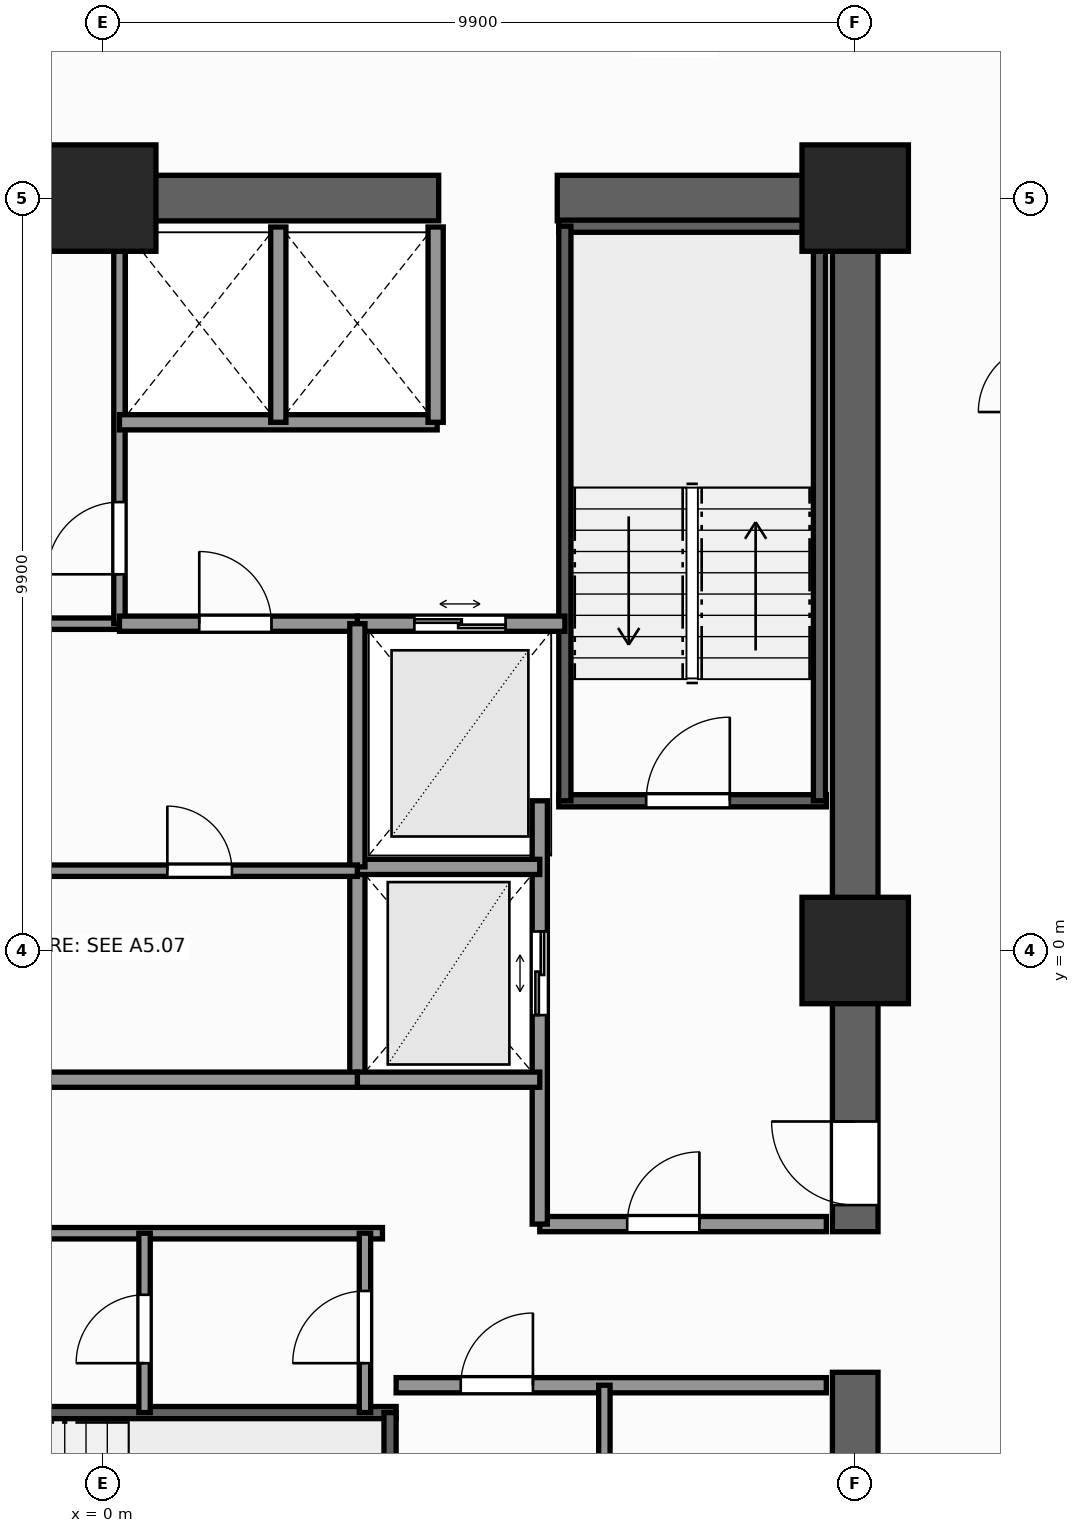
"""IFC4 building model, lengths in metres.
Left out: names, types, materials, properties, quantities, classifications, styles, units other than length and angle.
Written with IfcOpenShell. Run it as: python <this file> out.ifc"""

import sys

from ifc_helpers import new_model, si_unit, direction, frame, frame_2d, origin, origin_2d, place, context, subcontext, project, spatial, rectangle, extrude, element, fill, save


model = new_model("IFC4")
c1 = context("Model", 3, precision=1e-05, world=origin(), true_north=direction((0.0, 1.0)))
c2 = subcontext(c1, "Body", "Model", "MODEL_VIEW")
j1 = project(units=[si_unit("LENGTHUNIT", "METRE"), si_unit("PLANEANGLEUNIT", "RADIAN")], contexts=[c1])
p1 = place(None, origin())
s1 = spatial("IfcSite", under=j1, at=p1, CompositionType="ELEMENT")
p2 = place(p1, origin())
s2 = spatial("IfcBuilding", under=s1, at=p2, CompositionType="ELEMENT")
p3 = place(p2, frame((0.0, 0.0, 92.0)))
s3 = spatial("IfcBuildingStorey", under=s2, at=p3, CompositionType="ELEMENT", Elevation=92.0)
p4 = place(p3, frame((-10.2, 9.9, 0.0), z_axis=(0.0, 0.0, 1.0), x_axis=(1.0, 0.0, 0.0)))
e1 = element("IfcWall", 1, at=p4, inside=s3, PredefinedType="SHEAR", context=c2, shape_type="SweptSolid", body=[
    extrude(rectangle(XDim=14.62, YDim=0.6, at=frame_2d((7.31, 0.0))), origin(), (0.0, 0.0, 1.0), 3.3),
])
p5 = place(p3, frame((5.98, 9.9, 0.0), z_axis=(0.0, 0.0, 1.0), x_axis=(1.0, 0.0, 0.0)))
e2 = element("IfcWall", 2, at=p5, inside=s3, PredefinedType="SHEAR", context=c2, shape_type="SweptSolid", body=[
    extrude(rectangle(XDim=4.22, YDim=0.6, at=frame_2d((2.11, 0.0))), origin(), (0.0, 0.0, 1.0), 3.3),
])
p6 = place(p3, frame((9.9, -9.6, 0.0), z_axis=(0.0, 0.0, 1.0), x_axis=(0.0, 1.0, 0.0)))
e3 = element("IfcWall", 3, at=p6, inside=s3, PredefinedType="SHEAR", context=c2, shape_type="SweptSolid", body=[
    extrude(rectangle(XDim=4.05, YDim=0.6, at=frame_2d((2.025, 0.0))), origin(), (0.0, 0.0, 1.0), 3.3),
])
p7 = place(p3, frame((9.9, -3.7, 0.0), z_axis=(0.0, 0.0, 1.0), x_axis=(0.0, 1.0, 0.0)))
e4 = element("IfcWall", 4, at=p7, inside=s3, PredefinedType="SHEAR", context=c2, shape_type="SweptSolid", body=[
    extrude(rectangle(XDim=13.3, YDim=0.6, at=frame_2d((6.65, 0.0))), origin(), (0.0, 0.0, 1.0), 3.3),
])
p8 = place(p7, frame((0.35, 0.0, 0.0)))
e5 = element("IfcOpeningElement", 5, at=p8, cuts=e4, PredefinedType="OPENING", context=c2, shape_type="SweptSolid", body=[
    extrude(rectangle(XDim=1.1, YDim=2.2, at=frame_2d((0.55, 1.1))), frame((0.0, 0.31, 0.0), z_axis=(0.0, -1.0, 0.0), x_axis=(1.0, 0.0, 0.0)), (0.0, 0.0, 1.0), 0.62),
])
for number, where, z_axis, x_axis in (
    (6, (9.9, 9.9, 0.0), (0.0, 0.0, 1.0), (1.0, 0.0, 0.0)),
    (7, (9.9, 0.0, 0.0), (0.0, 0.0, 1.0), (1.0, 0.0, 0.0)),
    (8, (0.0, 9.9, 0.0), (0.0, 0.0, 1.0), (1.0, 0.0, 0.0)),
):
    element("IfcColumn", number, at=place(p3, frame(where, z_axis=z_axis, x_axis=x_axis)), inside=s3, PredefinedType="COLUMN", context=c2, shape_type="SweptSolid", body=[
        extrude(rectangle(XDim=1.4, YDim=1.4, at=origin_2d()), origin(), (0.0, 0.0, 1.0), 3.3),
    ])
p9 = place(p3, frame((6.0, 1.97, 0.0), z_axis=(0.0, 0.0, 1.0), x_axis=(1.0, 0.0, 0.0)))
e9 = element("IfcWall", 9, at=p9, inside=s3, PredefinedType="SHEAR", context=c2, shape_type="SweptSolid", body=[
    extrude(rectangle(XDim=3.52, YDim=0.16, at=frame_2d((1.76, 0.0))), origin(), (0.0, 0.0, 1.0), 3.3),
])
p10 = place(p9, frame((1.15, 0.0, 0.0)))
e10 = element("IfcOpeningElement", 10, at=p10, cuts=e9, PredefinedType="OPENING", context=c2, shape_type="SweptSolid", body=[
    extrude(rectangle(XDim=1.1, YDim=2.2, at=frame_2d((0.55, 1.1))), frame((0.0, 0.09, 0.0), z_axis=(0.0, -1.0, 0.0), x_axis=(1.0, 0.0, 0.0)), (0.0, 0.0, 1.0), 0.18),
])
p11 = place(p3, frame((6.0, 9.53, 0.0), z_axis=(0.0, 0.0, 1.0), x_axis=(1.0, 0.0, 0.0)))
e11 = element("IfcWall", 11, at=p11, inside=s3, PredefinedType="SHEAR", context=c2, shape_type="SweptSolid", body=[
    extrude(rectangle(XDim=3.52, YDim=0.16, at=frame_2d((1.76, 0.0))), origin(), (0.0, 0.0, 1.0), 3.3),
])
for number, where, z_axis, x_axis in (
    (12, (6.08, 1.97, 0.0), (0.0, 0.0, 1.0), (0.0, 1.0, 0.0)),
    (13, (9.43, 1.97, 0.0), (0.0, 0.0, 1.0), (0.0, 1.0, 0.0)),
):
    element("IfcWall", number, at=place(p3, frame(where, z_axis=z_axis, x_axis=x_axis)), inside=s3, PredefinedType="SHEAR", context=c2, shape_type="SweptSolid", body=[
        extrude(rectangle(XDim=7.56, YDim=0.16, at=frame_2d((3.78, 0.0))), origin(), (0.0, 0.0, 1.0), 3.3),
    ])
p12 = place(p3, frame((-3.86, -6.08, 0.0), z_axis=(0.0, 0.0, 1.0), x_axis=(1.0, 0.0, 0.0)))
e14 = element("IfcWall", 14, at=p12, inside=s3, PredefinedType="SHEAR", context=c2, shape_type="SweptSolid", body=[
    extrude(rectangle(XDim=7.72, YDim=0.16, at=frame_2d((3.86, 0.0))), origin(), (0.0, 0.0, 1.0), 3.3),
])
p13 = place(p3, frame((3.78, -9.43, 0.0), z_axis=(0.0, 0.0, 1.0), x_axis=(0.0, 1.0, 0.0)))
e15 = element("IfcWall", 15, at=p13, inside=s3, PredefinedType="SHEAR", context=c2, shape_type="SweptSolid", body=[
    extrude(rectangle(XDim=3.35, YDim=0.16, at=frame_2d((1.675, 0.0))), origin(), (0.0, 0.0, 1.0), 3.3),
])
p14 = place(p3, frame((5.75, -3.6, 0.0), z_axis=(0.0, 0.0, 1.0), x_axis=(1.0, 0.0, 0.0)))
e16 = element("IfcWall", 16, at=p14, inside=s3, PredefinedType="SOLIDWALL", context=c2, shape_type="SweptSolid", body=[
    extrude(rectangle(XDim=3.77, YDim=0.2, at=frame_2d((1.885, 0.0))), origin(), (0.0, 0.0, 1.0), 3.08),
])
p15 = place(p14, frame((1.15, 0.0, 0.0)))
e17 = element("IfcOpeningElement", 17, at=p15, cuts=e16, PredefinedType="OPENING", context=c2, shape_type="SweptSolid", body=[
    extrude(rectangle(XDim=0.95, YDim=2.06, at=frame_2d((0.475, 1.03))), frame((0.0, 0.11, 0.0), z_axis=(0.0, -1.0, 0.0), x_axis=(1.0, 0.0, 0.0)), (0.0, 0.0, 1.0), 0.22),
])
p16 = place(p3, frame((5.75, -3.6, 0.0), z_axis=(0.0, 0.0, 1.0), x_axis=(0.0, 1.0, 0.0)))
e18 = element("IfcWall", 18, at=p16, inside=s3, PredefinedType="SOLIDWALL", context=c2, shape_type="SweptSolid", body=[
    extrude(rectangle(XDim=5.57, YDim=0.2, at=frame_2d((2.785, 0.0))), origin(), (0.0, 0.0, 1.0), 3.08),
])
p17 = place(p16, frame((2.75, 0.0, 0.0)))
e19 = element("IfcOpeningElement", 19, at=p17, cuts=e18, PredefinedType="OPENING", context=c2, shape_type="SweptSolid", body=[
    extrude(rectangle(XDim=1.1, YDim=2.2, at=frame_2d((0.55, 1.1))), frame((0.0, 0.11, 0.0), z_axis=(0.0, -1.0, 0.0), x_axis=(1.0, 0.0, 0.0)), (0.0, 0.0, 1.0), 0.22),
])
p18 = place(p3, frame((3.35, -1.7, 0.0), z_axis=(0.0, 0.0, 1.0), x_axis=(0.0, 1.0, 0.0)))
e20 = element("IfcWall", 20, at=p18, inside=s3, PredefinedType="SOLIDWALL", context=c2, shape_type="SweptSolid", body=[
    extrude(rectangle(XDim=2.8, YDim=0.2, at=frame_2d((1.4, 0.0))), origin(), (0.0, 0.0, 1.0), 3.08),
])
for number, where, z_axis, x_axis in (
    (21, (3.35, -1.7, 0.0), (0.0, 0.0, 1.0), (1.0, 0.0, 0.0)),
    (22, (3.35, 1.1, 0.0), (0.0, 0.0, 1.0), (1.0, 0.0, 0.0)),
):
    element("IfcWall", number, at=place(p3, frame(where, z_axis=z_axis, x_axis=x_axis)), inside=s3, PredefinedType="SOLIDWALL", context=c2, shape_type="SweptSolid", body=[
        extrude(rectangle(XDim=2.4, YDim=0.2, at=frame_2d((1.2, 0.0))), origin(), (0.0, 0.0, 1.0), 3.08),
    ])
p19 = place(p3, frame((3.35, 4.3, 0.0), z_axis=(0.0, 0.0, 1.0), x_axis=(1.0, 0.0, 0.0)))
e23 = element("IfcWall", 23, at=p19, inside=s3, PredefinedType="SOLIDWALL", context=c2, shape_type="SweptSolid", body=[
    extrude(rectangle(XDim=2.73, YDim=0.2, at=frame_2d((1.365, 0.0))), origin(), (0.0, 0.0, 1.0), 3.08),
])
p20 = place(p19, frame((0.75, 0.0, 0.0)))
e24 = element("IfcOpeningElement", 24, at=p20, cuts=e23, PredefinedType="OPENING", context=c2, shape_type="SweptSolid", body=[
    extrude(rectangle(XDim=1.2, YDim=2.25, at=frame_2d((0.6, 1.125))), frame((0.0, 0.11, 0.0), z_axis=(0.0, -1.0, 0.0), x_axis=(1.0, 0.0, 0.0)), (0.0, 0.0, 1.0), 0.22),
])
p21 = place(p3, frame((-6.08, 4.3, 0.0), z_axis=(0.0, 0.0, 1.0), x_axis=(1.0, 0.0, 0.0)))
e25 = element("IfcWall", 25, at=p21, inside=s3, PredefinedType="PARTITIONING", context=c2, shape_type="SweptSolid", body=[
    extrude(rectangle(XDim=6.3, YDim=0.15, at=frame_2d((3.15, 0.0))), origin(), (0.0, 0.0, 1.0), 3.08),
])
p22 = place(p21, frame((1.05, 0.0, 0.0)))
e26 = element("IfcOpeningElement", 26, at=p22, cuts=e25, PredefinedType="OPENING", context=c2, shape_type="SweptSolid", body=[
    extrude(rectangle(XDim=0.85, YDim=2.03, at=frame_2d((0.425, 1.015))), frame((0.0, 0.085, 0.0), z_axis=(0.0, -1.0, 0.0), x_axis=(1.0, 0.0, 0.0)), (0.0, 0.0, 1.0), 0.17),
])
p23 = place(p3, frame((0.22, 4.3, 0.0), z_axis=(0.0, 0.0, 1.0), x_axis=(0.0, 1.0, 0.0)))
e27 = element("IfcWall", 27, at=p23, inside=s3, PredefinedType="PARTITIONING", context=c2, shape_type="SweptSolid", body=[
    extrude(rectangle(XDim=5.22, YDim=0.15, at=frame_2d((2.61, 0.0))), origin(), (0.0, 0.0, 1.0), 3.08),
])
p24 = place(p23, frame((0.65, 0.0, 0.0)))
e28 = element("IfcOpeningElement", 28, at=p24, cuts=e27, PredefinedType="OPENING", context=c2, shape_type="SweptSolid", body=[
    extrude(rectangle(XDim=0.95, YDim=2.06, at=frame_2d((0.475, 1.03))), frame((0.0, 0.085, 0.0), z_axis=(0.0, -1.0, 0.0), x_axis=(1.0, 0.0, 0.0)), (0.0, 0.0, 1.0), 0.17),
])
p25 = place(p3, frame((0.22, 6.95, 0.0), z_axis=(0.0, 0.0, 1.0), x_axis=(1.0, 0.0, 0.0)))
e29 = element("IfcWall", 29, at=p25, inside=s3, PredefinedType="SOLIDWALL", context=c2, shape_type="SweptSolid", body=[
    extrude(rectangle(XDim=4.18, YDim=0.2, at=frame_2d((2.09, 0.0))), origin(), (0.0, 0.0, 1.0), 3.08),
])
for number, where, z_axis, x_axis in (
    (30, (4.38, 6.95, 0.0), (0.0, 0.0, 1.0), (0.0, 1.0, 0.0)),
    (31, (2.31, 6.95, 0.0), (0.0, 0.0, 1.0), (0.0, 1.0, 0.0)),
):
    element("IfcWall", number, at=place(p3, frame(where, z_axis=z_axis, x_axis=x_axis)), inside=s3, PredefinedType="SOLIDWALL", context=c2, shape_type="SweptSolid", body=[
        extrude(rectangle(XDim=2.57, YDim=0.2, at=frame_2d((1.285, 0.0))), origin(), (0.0, 0.0, 1.0), 3.08),
    ])
p26 = place(p3, frame((3.86, -5.72, 0.0), z_axis=(0.0, 0.0, 1.0), x_axis=(1.0, 0.0, 0.0)))
e32 = element("IfcWall", 32, at=p26, inside=s3, PredefinedType="SOLIDWALL", context=c2, shape_type="SweptSolid", body=[
    extrude(rectangle(XDim=5.66, YDim=0.2, at=frame_2d((2.83, 0.0))), origin(), (0.0, 0.0, 1.0), 3.08),
])
p27 = place(p26, frame((0.85, 0.0, 0.0)))
e33 = element("IfcOpeningElement", 33, at=p27, cuts=e32, PredefinedType="OPENING", context=c2, shape_type="SweptSolid", body=[
    extrude(rectangle(XDim=0.95, YDim=2.06, at=frame_2d((0.475, 1.03))), frame((0.0, 0.11, 0.0), z_axis=(0.0, -1.0, 0.0), x_axis=(1.0, 0.0, 0.0)), (0.0, 0.0, 1.0), 0.22),
])
p28 = place(p3, frame((6.6, -9.52, 0.0), z_axis=(0.0, 0.0, 1.0), x_axis=(0.0, 1.0, 0.0)))
e34 = element("IfcWall", 34, at=p28, inside=s3, PredefinedType="PARTITIONING", context=c2, shape_type="SweptSolid", body=[
    extrude(rectangle(XDim=3.8, YDim=0.15, at=frame_2d((1.9, 0.0))), origin(), (0.0, 0.0, 1.0), 3.08),
])
p29 = place(p28, frame((0.9, 0.0, 0.0)))
e35 = element("IfcOpeningElement", 35, at=p29, cuts=e34, PredefinedType="OPENING", context=c2, shape_type="SweptSolid", body=[
    extrude(rectangle(XDim=0.85, YDim=2.03, at=frame_2d((0.425, 1.015))), frame((0.0, 0.085, 0.0), z_axis=(0.0, -1.0, 0.0), x_axis=(1.0, 0.0, 0.0)), (0.0, 0.0, 1.0), 0.17),
])
p30 = place(p3, frame((0.22, 4.3, 0.0), z_axis=(0.0, 0.0, 1.0), x_axis=(1.0, 0.0, 0.0)))
e36 = element("IfcWall", 36, at=p30, inside=s3, PredefinedType="SOLIDWALL", context=c2, shape_type="SweptSolid", body=[
    extrude(rectangle(XDim=3.13, YDim=0.2, at=frame_2d((1.565, 0.0))), origin(), (0.0, 0.0, 1.0), 3.08),
])
p31 = place(p30, frame((1.05, 0.0, 0.0)))
e37 = element("IfcOpeningElement", 37, at=p31, cuts=e36, PredefinedType="OPENING", context=c2, shape_type="SweptSolid", body=[
    extrude(rectangle(XDim=0.95, YDim=2.06, at=frame_2d((0.475, 1.03))), frame((0.0, 0.11, 0.0), z_axis=(0.0, -1.0, 0.0), x_axis=(1.0, 0.0, 0.0)), (0.0, 0.0, 1.0), 0.22),
])
p32 = place(p3, frame((-3.35, -1.7, 0.0), z_axis=(0.0, 0.0, 1.0), x_axis=(1.0, 0.0, 0.0)))
e38 = element("IfcWall", 38, at=p32, inside=s3, PredefinedType="SOLIDWALL", context=c2, shape_type="SweptSolid", body=[
    extrude(rectangle(XDim=6.7, YDim=0.2, at=frame_2d((3.35, 0.0))), origin(), (0.0, 0.0, 1.0), 3.08),
])
p33 = place(p3, frame((3.35, 1.1, 0.0), z_axis=(0.0, 0.0, 1.0), x_axis=(0.0, 1.0, 0.0)))
e39 = element("IfcWall", 39, at=p33, inside=s3, PredefinedType="SOLIDWALL", context=c2, shape_type="SweptSolid", body=[
    extrude(rectangle(XDim=3.2, YDim=0.2, at=frame_2d((1.6, 0.0))), origin(), (0.0, 0.0, 1.0), 3.08),
])
p34 = place(p3, frame((-3.35, 1.05, 0.0), z_axis=(0.0, 0.0, 1.0), x_axis=(1.0, 0.0, 0.0)))
e40 = element("IfcWall", 40, at=p34, inside=s3, PredefinedType="PARTITIONING", context=c2, shape_type="SweptSolid", body=[
    extrude(rectangle(XDim=6.7, YDim=0.15, at=frame_2d((3.35, 0.0))), origin(), (0.0, 0.0, 1.0), 3.08),
])
p35 = place(p34, frame((4.2, 0.0, 0.0)))
e41 = element("IfcOpeningElement", 41, at=p35, cuts=e40, PredefinedType="OPENING", context=c2, shape_type="SweptSolid", body=[
    extrude(rectangle(XDim=0.85, YDim=2.03, at=frame_2d((0.425, 1.015))), frame((0.0, 0.085, 0.0), z_axis=(0.0, -1.0, 0.0), x_axis=(1.0, 0.0, 0.0)), (0.0, 0.0, 1.0), 0.17),
])
p36 = place(p3, frame((-3.68, -3.72, 0.0), z_axis=(0.0, 0.0, 1.0), x_axis=(1.0, 0.0, 0.0)))
e42 = element("IfcWall", 42, at=p36, inside=s3, PredefinedType="PARTITIONING", context=c2, shape_type="SweptSolid", body=[
    extrude(rectangle(XDim=7.36, YDim=0.15, at=frame_2d((3.68, 0.0))), origin(), (0.0, 0.0, 1.0), 3.08),
])
p37 = place(p3, frame((3.45, -6.08, 0.0), z_axis=(0.0, 0.0, 1.0), x_axis=(0.0, 1.0, 0.0)))
e43 = element("IfcWall", 43, at=p37, inside=s3, PredefinedType="PARTITIONING", context=c2, shape_type="SweptSolid", body=[
    extrude(rectangle(XDim=2.36, YDim=0.15, at=frame_2d((1.18, 0.0))), origin(), (0.0, 0.0, 1.0), 3.08),
])
p38 = place(p37, frame((0.65, 0.0, 0.0)))
e44 = element("IfcOpeningElement", 44, at=p38, cuts=e43, PredefinedType="OPENING", context=c2, shape_type="SweptSolid", body=[
    extrude(rectangle(XDim=0.95, YDim=2.06, at=frame_2d((0.475, 1.03))), frame((0.0, 0.085, 0.0), z_axis=(0.0, -1.0, 0.0), x_axis=(1.0, 0.0, 0.0)), (0.0, 0.0, 1.0), 0.17),
])
p39 = place(p3, frame((0.55, -6.08, 0.0), z_axis=(0.0, 0.0, 1.0), x_axis=(0.0, 1.0, 0.0)))
e45 = element("IfcWall", 45, at=p39, inside=s3, PredefinedType="PARTITIONING", context=c2, shape_type="SweptSolid", body=[
    extrude(rectangle(XDim=2.36, YDim=0.15, at=frame_2d((1.18, 0.0))), origin(), (0.0, 0.0, 1.0), 3.08),
])
p40 = place(p39, frame((0.65, 0.0, 0.0)))
e46 = element("IfcOpeningElement", 46, at=p40, cuts=e45, PredefinedType="OPENING", context=c2, shape_type="SweptSolid", body=[
    extrude(rectangle(XDim=0.9, YDim=2.06, at=frame_2d((0.45, 1.03))), frame((0.0, 0.085, 0.0), z_axis=(0.0, -1.0, 0.0), x_axis=(1.0, 0.0, 0.0)), (0.0, 0.0, 1.0), 0.17),
])
p41 = place(p10, origin())
e47 = element("IfcDoor", 47, at=p41, inside=s3, OperationType="SINGLE_SWING_RIGHT", PredefinedType="DOOR", context=c2, shape_type="SweptSolid", body=[
    extrude(rectangle(XDim=1.1, YDim=2.2, at=frame_2d((0.55, 1.1))), frame((0.0, 0.025, 0.0), z_axis=(0.0, -1.0, 0.0), x_axis=(1.0, 0.0, 0.0)), (0.0, 0.0, 1.0), 0.05),
])
fill(e10, e47)
p42 = place(p8, origin())
e48 = element("IfcDoor", 48, at=p42, inside=s3, OperationType="SINGLE_SWING_RIGHT", PredefinedType="DOOR", context=c2, shape_type="SweptSolid", body=[
    extrude(rectangle(XDim=1.1, YDim=2.2, at=frame_2d((0.55, 1.1))), frame((0.0, 0.025, 0.0), z_axis=(0.0, -1.0, 0.0), x_axis=(1.0, 0.0, 0.0)), (0.0, 0.0, 1.0), 0.05),
])
fill(e5, e48)
p43 = place(p17, origin())
e49 = element("IfcDoor", 49, at=p43, inside=s3, OperationType="DOUBLE_DOOR_SLIDING", PredefinedType="DOOR", context=c2, shape_type="SweptSolid", body=[
    extrude(rectangle(XDim=1.1, YDim=2.2, at=frame_2d((0.55, 1.1))), frame((0.0, 0.025, 0.0), z_axis=(0.0, -1.0, 0.0), x_axis=(1.0, 0.0, 0.0)), (0.0, 0.0, 1.0), 0.05),
])
fill(e19, e49)
p44 = place(p20, origin())
e50 = element("IfcDoor", 50, at=p44, inside=s3, OperationType="DOUBLE_DOOR_SLIDING", PredefinedType="DOOR", context=c2, shape_type="SweptSolid", body=[
    extrude(rectangle(XDim=1.2, YDim=2.25, at=frame_2d((0.6, 1.125))), frame((0.0, 0.025, 0.0), z_axis=(0.0, -1.0, 0.0), x_axis=(1.0, 0.0, 0.0)), (0.0, 0.0, 1.0), 0.05),
])
fill(e24, e50)
p45 = place(p24, origin())
e51 = element("IfcDoor", 51, at=p45, inside=s3, OperationType="SINGLE_SWING_LEFT", PredefinedType="DOOR", context=c2, shape_type="SweptSolid", body=[
    extrude(rectangle(XDim=0.95, YDim=2.06, at=frame_2d((0.475, 1.03))), frame((0.0, 0.025, 0.0), z_axis=(0.0, -1.0, 0.0), x_axis=(1.0, 0.0, 0.0)), (0.0, 0.0, 1.0), 0.05),
])
fill(e28, e51)
p46 = place(p27, origin())
e52 = element("IfcDoor", 52, at=p46, inside=s3, OperationType="SINGLE_SWING_RIGHT", PredefinedType="DOOR", context=c2, shape_type="SweptSolid", body=[
    extrude(rectangle(XDim=0.95, YDim=2.06, at=frame_2d((0.475, 1.03))), frame((0.0, 0.025, 0.0), z_axis=(0.0, -1.0, 0.0), x_axis=(1.0, 0.0, 0.0)), (0.0, 0.0, 1.0), 0.05),
])
fill(e33, e52)
p47 = place(p15, origin())
e53 = element("IfcDoor", 53, at=p47, inside=s3, OperationType="SINGLE_SWING_RIGHT", PredefinedType="DOOR", context=c2, shape_type="SweptSolid", body=[
    extrude(rectangle(XDim=0.95, YDim=2.06, at=frame_2d((0.475, 1.03))), frame((0.0, 0.025, 0.0), z_axis=(0.0, -1.0, 0.0), x_axis=(1.0, 0.0, 0.0)), (0.0, 0.0, 1.0), 0.05),
])
fill(e17, e53)
p48 = place(p31, origin())
e54 = element("IfcDoor", 54, at=p48, inside=s3, OperationType="SINGLE_SWING_LEFT", PredefinedType="DOOR", context=c2, shape_type="SweptSolid", body=[
    extrude(rectangle(XDim=0.95, YDim=2.06, at=frame_2d((0.475, 1.03))), frame((0.0, 0.025, 0.0), z_axis=(0.0, -1.0, 0.0), x_axis=(1.0, 0.0, 0.0)), (0.0, 0.0, 1.0), 0.05),
])
fill(e37, e54)
p49 = place(p35, origin())
e55 = element("IfcDoor", 55, at=p49, inside=s3, OperationType="SINGLE_SWING_LEFT", PredefinedType="DOOR", context=c2, shape_type="SweptSolid", body=[
    extrude(rectangle(XDim=0.85, YDim=2.03, at=frame_2d((0.425, 1.015))), frame((0.0, 0.025, 0.0), z_axis=(0.0, -1.0, 0.0), x_axis=(1.0, 0.0, 0.0)), (0.0, 0.0, 1.0), 0.05),
])
fill(e41, e55)
p50 = place(p38, origin())
e56 = element("IfcDoor", 56, at=p50, inside=s3, OperationType="SINGLE_SWING_LEFT", PredefinedType="DOOR", context=c2, shape_type="SweptSolid", body=[
    extrude(rectangle(XDim=0.95, YDim=2.06, at=frame_2d((0.475, 1.03))), frame((0.0, 0.025, 0.0), z_axis=(0.0, -1.0, 0.0), x_axis=(1.0, 0.0, 0.0)), (0.0, 0.0, 1.0), 0.05),
])
fill(e44, e56)
p51 = place(p40, origin())
e57 = element("IfcDoor", 57, at=p51, inside=s3, OperationType="SINGLE_SWING_LEFT", PredefinedType="DOOR", context=c2, shape_type="SweptSolid", body=[
    extrude(rectangle(XDim=0.9, YDim=2.06, at=frame_2d((0.45, 1.03))), frame((0.0, 0.025, 0.0), z_axis=(0.0, -1.0, 0.0), x_axis=(1.0, 0.0, 0.0)), (0.0, 0.0, 1.0), 0.05),
])
fill(e46, e57)
save(model, sys.argv[1])
